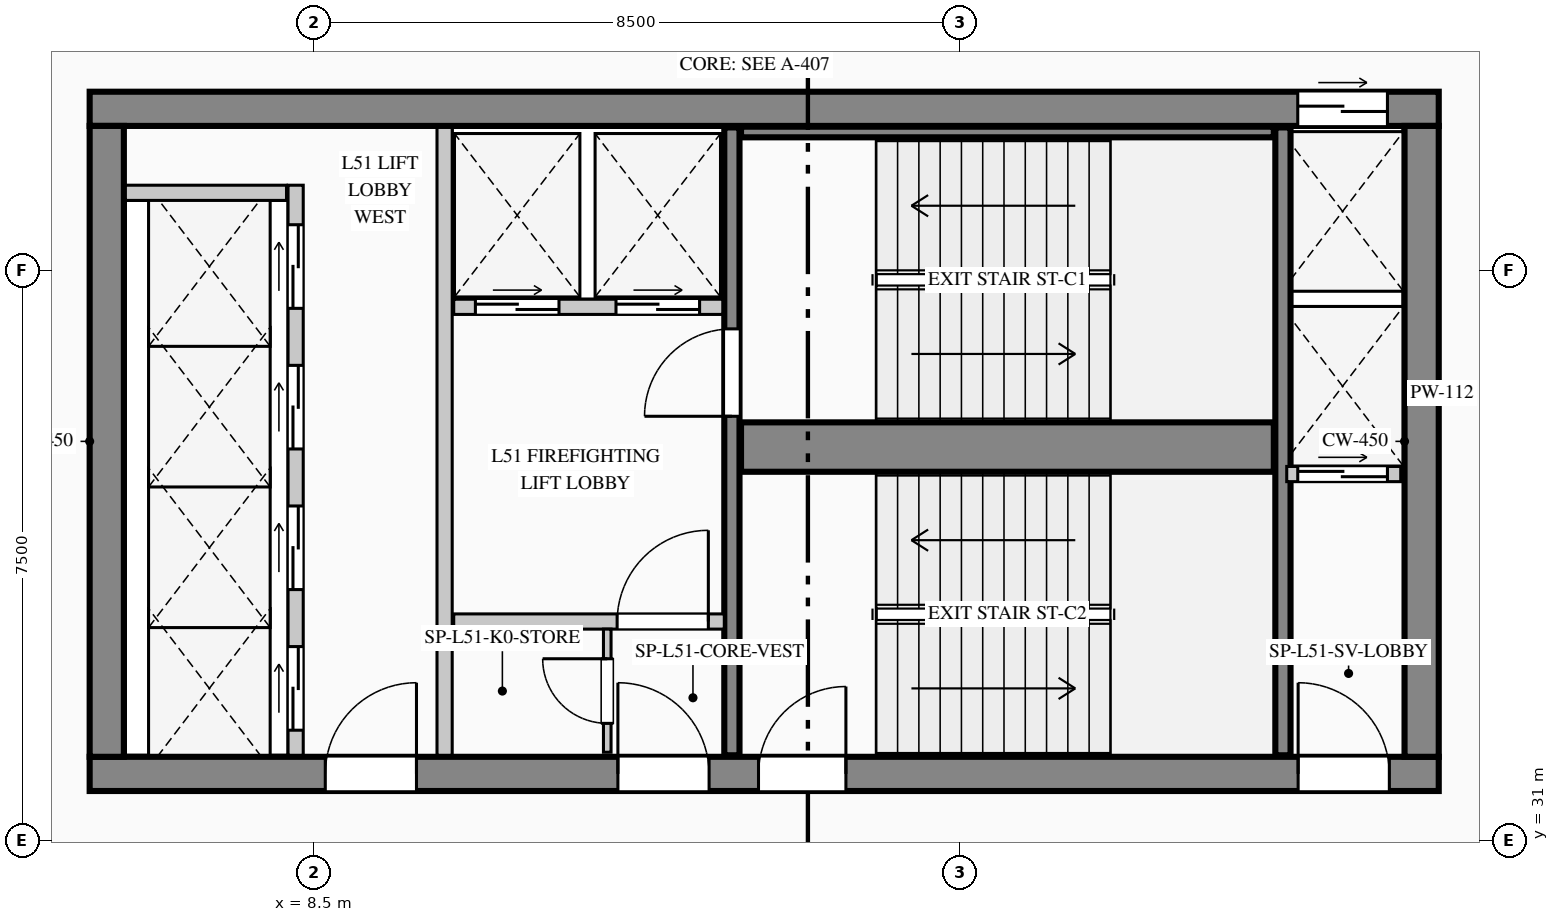
"""IFC4 building model, lengths in metres.
Left out: names, types, materials, properties, quantities, classifications, styles, units other than length and angle.
Written with IfcOpenShell. Run it as: python <this file> out.ifc"""

import sys

from ifc_helpers import new_model, si_unit, direction, frame, frame_2d, origin, place, context, subcontext, project, spatial, rectangle, extrude, element, fill, save


model = new_model("IFC4")
c1 = context("Model", 3, precision=1e-05, world=origin(), true_north=direction((0.0, 1.0)))
c2 = subcontext(c1, "Body", "Model", "MODEL_VIEW")
j1 = project(units=[si_unit("LENGTHUNIT", "METRE"), si_unit("PLANEANGLEUNIT", "RADIAN")], contexts=[c1])
p1 = place(None, origin())
s1 = spatial("IfcSite", under=j1, at=p1, CompositionType="ELEMENT")
p2 = place(p1, origin())
s2 = spatial("IfcBuilding", under=s1, at=p2, CompositionType="ELEMENT")
p3 = place(p2, frame((0.0, 0.0, 215.35)))
s3 = spatial("IfcBuildingStorey", under=s2, at=p3, CompositionType="ELEMENT", Elevation=215.35)
p4 = place(p3, frame((5.55, 40.625, 0.0), z_axis=(0.0, 0.0, 1.0), x_axis=(1.0, 0.0, 0.0)))
e1 = element("IfcWall", 1, at=p4, inside=s3, PredefinedType="SHEAR", context=c2, shape_type="SweptSolid", body=[
    extrude(rectangle(XDim=17.75, YDim=0.45, at=frame_2d((8.875, 0.0))), origin(), (0.0, 0.0, 1.0), 3.95),
])
p5 = place(p4, frame((15.895, 0.0, 0.0)))
e2 = element("IfcOpeningElement", 2, at=p5, cuts=e1, PredefinedType="OPENING", context=c2, shape_type="SweptSolid", body=[
    extrude(rectangle(XDim=1.18, YDim=2.25, at=frame_2d((0.59, 1.125))), frame((0.0, 0.235, 0.0), z_axis=(0.0, -1.0, 0.0), x_axis=(1.0, 0.0, 0.0)), (0.0, 0.0, 1.0), 0.47),
])
p6 = place(p3, frame((5.55, 31.875, 0.0), z_axis=(0.0, 0.0, 1.0), x_axis=(1.0, 0.0, 0.0)))
e3 = element("IfcWall", 3, at=p6, inside=s3, PredefinedType="SHEAR", context=c2, shape_type="SweptSolid", body=[
    extrude(rectangle(XDim=17.75, YDim=0.45, at=frame_2d((8.875, 0.0))), origin(), (0.0, 0.0, 1.0), 3.95),
])
p7 = place(p6, frame((3.1, 0.0, 0.0)))
e4 = element("IfcOpeningElement", 4, at=p7, cuts=e3, PredefinedType="OPENING", context=c2, shape_type="SweptSolid", body=[
    extrude(rectangle(XDim=1.2, YDim=2.2, at=frame_2d((0.6, 1.1))), frame((0.0, 0.235, 0.0), z_axis=(0.0, -1.0, 0.0), x_axis=(1.0, 0.0, 0.0)), (0.0, 0.0, 1.0), 0.47),
])
p8 = place(p6, frame((6.95, 0.0, 0.0)))
e5 = element("IfcOpeningElement", 5, at=p8, cuts=e3, PredefinedType="OPENING", context=c2, shape_type="SweptSolid", body=[
    extrude(rectangle(XDim=1.2, YDim=2.2, at=frame_2d((0.6, 1.1))), frame((0.0, 0.235, 0.0), z_axis=(0.0, -1.0, 0.0), x_axis=(1.0, 0.0, 0.0)), (0.0, 0.0, 1.0), 0.47),
])
p9 = place(p6, frame((8.8, 0.0, 0.0)))
e6 = element("IfcOpeningElement", 6, at=p9, cuts=e3, PredefinedType="OPENING", context=c2, shape_type="SweptSolid", body=[
    extrude(rectangle(XDim=1.15, YDim=2.2, at=frame_2d((0.575, 1.1))), frame((0.0, 0.235, 0.0), z_axis=(0.0, -1.0, 0.0), x_axis=(1.0, 0.0, 0.0)), (0.0, 0.0, 1.0), 0.47),
])
p10 = place(p6, frame((15.9, 0.0, 0.0)))
e7 = element("IfcOpeningElement", 7, at=p10, cuts=e3, PredefinedType="OPENING", context=c2, shape_type="SweptSolid", body=[
    extrude(rectangle(XDim=1.2, YDim=2.2, at=frame_2d((0.6, 1.1))), frame((0.0, 0.235, 0.0), z_axis=(0.0, -1.0, 0.0), x_axis=(1.0, 0.0, 0.0)), (0.0, 0.0, 1.0), 0.47),
])
for number, where, z_axis, x_axis in (
    (8, (5.775, 32.1, 0.0), (0.0, 0.0, 1.0), (0.0, 1.0, 0.0)),
    (9, (23.075, 32.1, 0.0), (0.0, 0.0, 1.0), (0.0, 1.0, 0.0)),
):
    element("IfcWall", number, at=place(p3, frame(where, z_axis=z_axis, x_axis=x_axis)), inside=s3, PredefinedType="SHEAR", context=c2, shape_type="SweptSolid", body=[
        extrude(rectangle(XDim=8.3, YDim=0.45, at=frame_2d((4.15, 0.0))), origin(), (0.0, 0.0, 1.0), 3.95),
    ])
p11 = place(p3, frame((14.0, 32.12, 0.0), z_axis=(0.0, 0.0, 1.0), x_axis=(0.0, 1.0, 0.0)))
e10 = element("IfcWall", 10, at=p11, inside=s3, PredefinedType="SHEAR", context=c2, shape_type="SweptSolid", body=[
    extrude(rectangle(XDim=8.26, YDim=0.2, at=frame_2d((4.13, 0.0))), origin(), (0.0, 0.0, 1.0), 3.95),
])
p12 = place(p11, frame((4.46, 0.0, 0.0)))
e11 = element("IfcOpeningElement", 11, at=p12, cuts=e10, PredefinedType="OPENING", context=c2, shape_type="SweptSolid", body=[
    extrude(rectangle(XDim=1.15, YDim=2.2, at=frame_2d((0.575, 1.1))), frame((0.0, 0.11, 0.0), z_axis=(0.0, -1.0, 0.0), x_axis=(1.0, 0.0, 0.0)), (0.0, 0.0, 1.0), 0.22),
])
p13 = place(p3, frame((14.12, 36.175, 0.0), z_axis=(0.0, 0.0, 1.0), x_axis=(1.0, 0.0, 0.0)))
e12 = element("IfcWall", 12, at=p13, inside=s3, PredefinedType="SHEAR", context=c2, shape_type="SweptSolid", body=[
    extrude(rectangle(XDim=7.01, YDim=0.65, at=frame_2d((3.505, 0.0))), origin(), (0.0, 0.0, 1.0), 3.95),
])
p14 = place(p3, frame((21.25, 32.12, 0.0), z_axis=(0.0, 0.0, 1.0), x_axis=(0.0, 1.0, 0.0)))
e13 = element("IfcWall", 13, at=p14, inside=s3, PredefinedType="SHEAR", context=c2, shape_type="SweptSolid", body=[
    extrude(rectangle(XDim=8.26, YDim=0.2, at=frame_2d((4.13, 0.0))), origin(), (0.0, 0.0, 1.0), 3.95),
])
p15 = place(p3, frame((14.12, 40.32, 0.0), z_axis=(0.0, 0.0, 1.0), x_axis=(1.0, 0.0, 0.0)))
e14 = element("IfcWall", 14, at=p15, inside=s3, PredefinedType="SHEAR", context=c2, shape_type="SweptSolid", body=[
    extrude(rectangle(XDim=7.01, YDim=0.14, at=frame_2d((3.505, 0.0))), origin(), (0.0, 0.0, 1.0), 3.95),
])
p16 = place(p3, frame((7.46, 4.62, 0.0), z_axis=(0.0, 0.0, 1.0), x_axis=(-0.123515576323, 0.992342633573, 0.0)))
e15 = element("IfcWall", 15, at=p16, inside=s3, PredefinedType="STANDARD", context=c2, shape_type="SweptSolid", body=[
    extrude(rectangle(XDim=37.043, YDim=0.24, at=frame_2d((18.522, 0.0))), origin(), (0.0, 0.0, 1.0), 3.7),
])
p17 = place(p16, frame((10.032, 0.0, 0.9)))
e16 = element("IfcOpeningElement", 16, at=p17, cuts=e15, PredefinedType="OPENING", context=c2, shape_type="SweptSolid", body=[
    extrude(rectangle(XDim=2.7, YDim=2.1, at=frame_2d((1.35, 1.05))), frame((0.0, 0.13, 0.0), z_axis=(0.0, -1.0, 0.0), x_axis=(1.0, 0.0, 0.0)), (0.0, 0.0, 1.0), 0.26),
])
p18 = place(p3, frame((8.26, 32.12, 0.0), z_axis=(0.0, 0.0, 1.0), x_axis=(0.0, 1.0, 0.0)))
e17 = element("IfcWall", 17, at=p18, inside=s3, PredefinedType="PARTITIONING", context=c2, shape_type="SweptSolid", body=[
    extrude(rectangle(XDim=7.5, YDim=0.2, at=frame_2d((3.75, 0.0))), origin(), (0.0, 0.0, 1.0), 3.7),
])
p19 = place(p18, frame((0.33, 0.0, 0.0)))
e18 = element("IfcOpeningElement", 18, at=p19, cuts=e17, PredefinedType="OPENING", context=c2, shape_type="SweptSolid", body=[
    extrude(rectangle(XDim=1.1, YDim=2.2, at=frame_2d((0.55, 1.1))), frame((0.0, 0.11, 0.0), z_axis=(0.0, -1.0, 0.0), x_axis=(1.0, 0.0, 0.0)), (0.0, 0.0, 1.0), 0.22),
])
p20 = place(p18, frame((2.18, 0.0, 0.0)))
e19 = element("IfcOpeningElement", 19, at=p20, cuts=e17, PredefinedType="OPENING", context=c2, shape_type="SweptSolid", body=[
    extrude(rectangle(XDim=1.1, YDim=2.2, at=frame_2d((0.55, 1.1))), frame((0.0, 0.11, 0.0), z_axis=(0.0, -1.0, 0.0), x_axis=(1.0, 0.0, 0.0)), (0.0, 0.0, 1.0), 0.22),
])
p21 = place(p18, frame((4.03, 0.0, 0.0)))
e20 = element("IfcOpeningElement", 20, at=p21, cuts=e17, PredefinedType="OPENING", context=c2, shape_type="SweptSolid", body=[
    extrude(rectangle(XDim=1.1, YDim=2.2, at=frame_2d((0.55, 1.1))), frame((0.0, 0.11, 0.0), z_axis=(0.0, -1.0, 0.0), x_axis=(1.0, 0.0, 0.0)), (0.0, 0.0, 1.0), 0.22),
])
p22 = place(p18, frame((5.88, 0.0, 0.0)))
e21 = element("IfcOpeningElement", 21, at=p22, cuts=e17, PredefinedType="OPENING", context=c2, shape_type="SweptSolid", body=[
    extrude(rectangle(XDim=1.1, YDim=2.2, at=frame_2d((0.55, 1.1))), frame((0.0, 0.11, 0.0), z_axis=(0.0, -1.0, 0.0), x_axis=(1.0, 0.0, 0.0)), (0.0, 0.0, 1.0), 0.22),
])
p23 = place(p3, frame((6.02, 39.52, 0.0), z_axis=(0.0, 0.0, 1.0), x_axis=(1.0, 0.0, 0.0)))
e22 = element("IfcWall", 22, at=p23, inside=s3, PredefinedType="PARTITIONING", context=c2, shape_type="SweptSolid", body=[
    extrude(rectangle(XDim=2.12, YDim=0.2, at=frame_2d((1.06, 0.0))), origin(), (0.0, 0.0, 1.0), 3.7),
])
p24 = place(p3, frame((10.22, 32.12, 0.0), z_axis=(0.0, 0.0, 1.0), x_axis=(0.0, 1.0, 0.0)))
e23 = element("IfcWall", 23, at=p24, inside=s3, PredefinedType="PARTITIONING", context=c2, shape_type="SweptSolid", body=[
    extrude(rectangle(XDim=8.26, YDim=0.2, at=frame_2d((4.13, 0.0))), origin(), (0.0, 0.0, 1.0), 3.7),
])
p25 = place(p3, frame((10.34, 38.02, 0.0), z_axis=(0.0, 0.0, 1.0), x_axis=(1.0, 0.0, 0.0)))
e24 = element("IfcWall", 24, at=p25, inside=s3, PredefinedType="PARTITIONING", context=c2, shape_type="SweptSolid", body=[
    extrude(rectangle(XDim=3.54, YDim=0.2, at=frame_2d((1.77, 0.0))), origin(), (0.0, 0.0, 1.0), 3.7),
])
p26 = place(p25, frame((0.285, 0.0, 0.0)))
e25 = element("IfcOpeningElement", 25, at=p26, cuts=e24, PredefinedType="OPENING", context=c2, shape_type="SweptSolid", body=[
    extrude(rectangle(XDim=1.1, YDim=2.2, at=frame_2d((0.55, 1.1))), frame((0.0, 0.11, 0.0), z_axis=(0.0, -1.0, 0.0), x_axis=(1.0, 0.0, 0.0)), (0.0, 0.0, 1.0), 0.22),
])
p27 = place(p25, frame((2.135, 0.0, 0.0)))
e26 = element("IfcOpeningElement", 26, at=p27, cuts=e24, PredefinedType="OPENING", context=c2, shape_type="SweptSolid", body=[
    extrude(rectangle(XDim=1.1, YDim=2.2, at=frame_2d((0.55, 1.1))), frame((0.0, 0.11, 0.0), z_axis=(0.0, -1.0, 0.0), x_axis=(1.0, 0.0, 0.0)), (0.0, 0.0, 1.0), 0.22),
])
p28 = place(p3, frame((10.34, 33.88, 0.0), z_axis=(0.0, 0.0, 1.0), x_axis=(1.0, 0.0, 0.0)))
e27 = element("IfcWall", 27, at=p28, inside=s3, PredefinedType="PARTITIONING", context=c2, shape_type="SweptSolid", body=[
    extrude(rectangle(XDim=3.56, YDim=0.2, at=frame_2d((1.78, 0.0))), origin(), (0.0, 0.0, 1.0), 3.7),
])
p29 = place(p28, frame((2.15, 0.0, 0.0)))
e28 = element("IfcOpeningElement", 28, at=p29, cuts=e27, PredefinedType="OPENING", context=c2, shape_type="SweptSolid", body=[
    extrude(rectangle(XDim=1.2, YDim=2.2, at=frame_2d((0.6, 1.1))), frame((0.0, 0.11, 0.0), z_axis=(0.0, -1.0, 0.0), x_axis=(1.0, 0.0, 0.0)), (0.0, 0.0, 1.0), 0.22),
])
p30 = place(p3, frame((12.36, 32.16, 0.0), z_axis=(0.0, 0.0, 1.0), x_axis=(0.0, 1.0, 0.0)))
e29 = element("IfcWall", 29, at=p30, inside=s3, PredefinedType="PARTITIONING", context=c2, shape_type="SweptSolid", body=[
    extrude(rectangle(XDim=1.62, YDim=0.1, at=frame_2d((0.81, 0.0))), origin(), (0.0, 0.0, 1.0), 3.7),
])
p31 = place(p30, frame((0.38, 0.0, 0.0)))
e30 = element("IfcOpeningElement", 30, at=p31, cuts=e29, PredefinedType="OPENING", context=c2, shape_type="SweptSolid", body=[
    extrude(rectangle(XDim=0.85, YDim=2.1, at=frame_2d((0.425, 1.05))), frame((0.0, 0.06, 0.0), z_axis=(0.0, -1.0, 0.0), x_axis=(1.0, 0.0, 0.0)), (0.0, 0.0, 1.0), 0.12),
])
p32 = place(p3, frame((21.3, 35.82, 0.0), z_axis=(0.0, 0.0, 1.0), x_axis=(1.0, 0.0, 0.0)))
e31 = element("IfcWall", 31, at=p32, inside=s3, PredefinedType="PARTITIONING", context=c2, shape_type="SweptSolid", body=[
    extrude(rectangle(XDim=1.5, YDim=0.2, at=frame_2d((0.75, 0.0))), origin(), (0.0, 0.0, 1.0), 3.7),
])
p33 = place(p32, frame((0.145, 0.0, 0.0)))
e32 = element("IfcOpeningElement", 32, at=p33, cuts=e31, PredefinedType="OPENING", context=c2, shape_type="SweptSolid", body=[
    extrude(rectangle(XDim=1.18, YDim=2.25, at=frame_2d((0.59, 1.125))), frame((0.0, 0.11, 0.0), z_axis=(0.0, -1.0, 0.0), x_axis=(1.0, 0.0, 0.0)), (0.0, 0.0, 1.0), 0.22),
])
p34 = place(p7, origin())
e33 = element("IfcDoor", 33, at=p34, inside=s3, OperationType="SINGLE_SWING_RIGHT", PredefinedType="DOOR", context=c2, shape_type="SweptSolid", body=[
    extrude(rectangle(XDim=1.2, YDim=2.2, at=frame_2d((0.6, 1.1))), frame((0.0, 0.025, 0.0), z_axis=(0.0, -1.0, 0.0), x_axis=(1.0, 0.0, 0.0)), (0.0, 0.0, 1.0), 0.05),
])
fill(e4, e33)
p35 = place(p8, origin())
e34 = element("IfcDoor", 34, at=p35, inside=s3, OperationType="SINGLE_SWING_LEFT", PredefinedType="DOOR", context=c2, shape_type="SweptSolid", body=[
    extrude(rectangle(XDim=1.2, YDim=2.2, at=frame_2d((0.6, 1.1))), frame((0.0, 0.025, 0.0), z_axis=(0.0, -1.0, 0.0), x_axis=(1.0, 0.0, 0.0)), (0.0, 0.0, 1.0), 0.05),
])
fill(e5, e34)
p36 = place(p9, origin())
e35 = element("IfcDoor", 35, at=p36, inside=s3, OperationType="SINGLE_SWING_RIGHT", PredefinedType="DOOR", context=c2, shape_type="SweptSolid", body=[
    extrude(rectangle(XDim=1.15, YDim=2.2, at=frame_2d((0.575, 1.1))), frame((0.0, 0.025, 0.0), z_axis=(0.0, -1.0, 0.0), x_axis=(1.0, 0.0, 0.0)), (0.0, 0.0, 1.0), 0.05),
])
fill(e6, e35)
p37 = place(p10, origin())
e36 = element("IfcDoor", 36, at=p37, inside=s3, OperationType="SINGLE_SWING_LEFT", PredefinedType="DOOR", context=c2, shape_type="SweptSolid", body=[
    extrude(rectangle(XDim=1.2, YDim=2.2, at=frame_2d((0.6, 1.1))), frame((0.0, 0.025, 0.0), z_axis=(0.0, -1.0, 0.0), x_axis=(1.0, 0.0, 0.0)), (0.0, 0.0, 1.0), 0.05),
])
fill(e7, e36)
p38 = place(p29, origin())
e37 = element("IfcDoor", 37, at=p38, inside=s3, OperationType="SINGLE_SWING_RIGHT", PredefinedType="DOOR", context=c2, shape_type="SweptSolid", body=[
    extrude(rectangle(XDim=1.2, YDim=2.2, at=frame_2d((0.6, 1.1))), frame((0.0, 0.025, 0.0), z_axis=(0.0, -1.0, 0.0), x_axis=(1.0, 0.0, 0.0)), (0.0, 0.0, 1.0), 0.05),
])
fill(e28, e37)
p39 = place(p31, origin())
e38 = element("IfcDoor", 38, at=p39, inside=s3, OperationType="SINGLE_SWING_RIGHT", PredefinedType="DOOR", context=c2, shape_type="SweptSolid", body=[
    extrude(rectangle(XDim=0.85, YDim=2.1, at=frame_2d((0.425, 1.05))), frame((0.0, 0.025, 0.0), z_axis=(0.0, -1.0, 0.0), x_axis=(1.0, 0.0, 0.0)), (0.0, 0.0, 1.0), 0.05),
])
fill(e30, e38)
p40 = place(p12, origin())
e39 = element("IfcDoor", 39, at=p40, inside=s3, OperationType="SINGLE_SWING_LEFT", PredefinedType="DOOR", context=c2, shape_type="SweptSolid", body=[
    extrude(rectangle(XDim=1.15, YDim=2.2, at=frame_2d((0.575, 1.1))), frame((0.0, 0.025, 0.0), z_axis=(0.0, -1.0, 0.0), x_axis=(1.0, 0.0, 0.0)), (0.0, 0.0, 1.0), 0.05),
])
fill(e11, e39)
p41 = place(p19, origin())
e40 = element("IfcDoor", 40, at=p41, inside=s3, OperationType="DOUBLE_DOOR_SLIDING", PredefinedType="DOOR", context=c2, shape_type="SweptSolid", body=[
    extrude(rectangle(XDim=1.1, YDim=2.2, at=frame_2d((0.55, 1.1))), frame((0.0, 0.025, 0.0), z_axis=(0.0, -1.0, 0.0), x_axis=(1.0, 0.0, 0.0)), (0.0, 0.0, 1.0), 0.05),
])
fill(e18, e40)
p42 = place(p20, origin())
e41 = element("IfcDoor", 41, at=p42, inside=s3, OperationType="DOUBLE_DOOR_SLIDING", PredefinedType="DOOR", context=c2, shape_type="SweptSolid", body=[
    extrude(rectangle(XDim=1.1, YDim=2.2, at=frame_2d((0.55, 1.1))), frame((0.0, 0.025, 0.0), z_axis=(0.0, -1.0, 0.0), x_axis=(1.0, 0.0, 0.0)), (0.0, 0.0, 1.0), 0.05),
])
fill(e19, e41)
p43 = place(p21, origin())
e42 = element("IfcDoor", 42, at=p43, inside=s3, OperationType="DOUBLE_DOOR_SLIDING", PredefinedType="DOOR", context=c2, shape_type="SweptSolid", body=[
    extrude(rectangle(XDim=1.1, YDim=2.2, at=frame_2d((0.55, 1.1))), frame((0.0, 0.025, 0.0), z_axis=(0.0, -1.0, 0.0), x_axis=(1.0, 0.0, 0.0)), (0.0, 0.0, 1.0), 0.05),
])
fill(e20, e42)
p44 = place(p22, origin())
e43 = element("IfcDoor", 43, at=p44, inside=s3, OperationType="DOUBLE_DOOR_SLIDING", PredefinedType="DOOR", context=c2, shape_type="SweptSolid", body=[
    extrude(rectangle(XDim=1.1, YDim=2.2, at=frame_2d((0.55, 1.1))), frame((0.0, 0.025, 0.0), z_axis=(0.0, -1.0, 0.0), x_axis=(1.0, 0.0, 0.0)), (0.0, 0.0, 1.0), 0.05),
])
fill(e21, e43)
p45 = place(p26, origin())
e44 = element("IfcDoor", 44, at=p45, inside=s3, OperationType="DOUBLE_DOOR_SLIDING", PredefinedType="DOOR", context=c2, shape_type="SweptSolid", body=[
    extrude(rectangle(XDim=1.1, YDim=2.2, at=frame_2d((0.55, 1.1))), frame((0.0, 0.025, 0.0), z_axis=(0.0, -1.0, 0.0), x_axis=(1.0, 0.0, 0.0)), (0.0, 0.0, 1.0), 0.05),
])
fill(e25, e44)
p46 = place(p27, origin())
e45 = element("IfcDoor", 45, at=p46, inside=s3, OperationType="DOUBLE_DOOR_SLIDING", PredefinedType="DOOR", context=c2, shape_type="SweptSolid", body=[
    extrude(rectangle(XDim=1.1, YDim=2.2, at=frame_2d((0.55, 1.1))), frame((0.0, 0.025, 0.0), z_axis=(0.0, -1.0, 0.0), x_axis=(1.0, 0.0, 0.0)), (0.0, 0.0, 1.0), 0.05),
])
fill(e26, e45)
p47 = place(p5, origin())
e46 = element("IfcDoor", 46, at=p47, inside=s3, OperationType="DOUBLE_DOOR_SLIDING", PredefinedType="DOOR", context=c2, shape_type="SweptSolid", body=[
    extrude(rectangle(XDim=1.18, YDim=2.25, at=frame_2d((0.59, 1.125))), frame((0.0, 0.025, 0.0), z_axis=(0.0, -1.0, 0.0), x_axis=(1.0, 0.0, 0.0)), (0.0, 0.0, 1.0), 0.05),
])
fill(e2, e46)
p48 = place(p33, origin())
e47 = element("IfcDoor", 47, at=p48, inside=s3, OperationType="DOUBLE_DOOR_SLIDING", PredefinedType="DOOR", context=c2, shape_type="SweptSolid", body=[
    extrude(rectangle(XDim=1.18, YDim=2.25, at=frame_2d((0.59, 1.125))), frame((0.0, 0.025, 0.0), z_axis=(0.0, -1.0, 0.0), x_axis=(1.0, 0.0, 0.0)), (0.0, 0.0, 1.0), 0.05),
])
fill(e32, e47)
save(model, sys.argv[1])
